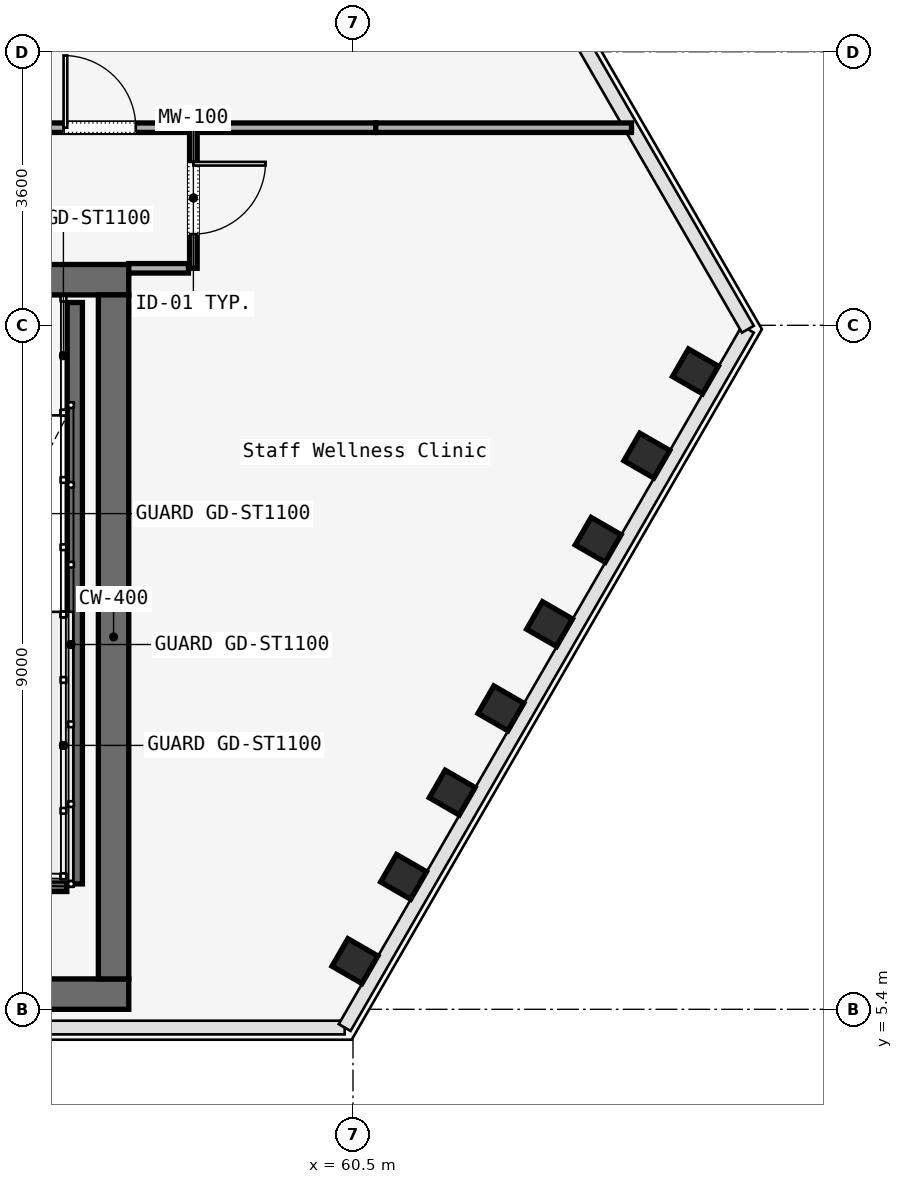
"""IFC4 building model, lengths in metres.
Left out: names, types, materials, properties, quantities, classifications, styles, units other than length and angle.
Written with IfcOpenShell. Run it as: python <this file> out.ifc"""

import sys

from ifc_helpers import new_model, si_unit, direction, frame, frame_2d, origin, origin_2d, place, context, subcontext, project, spatial, rectangle, i_section, extrude, element, fill, save


model = new_model("IFC4")
c1 = context("Model", 3, precision=1e-05, world=origin(), true_north=direction((0.0, 1.0)))
c2 = subcontext(c1, "Body", "Model", "MODEL_VIEW")
j1 = project(units=[si_unit("LENGTHUNIT", "METRE"), si_unit("PLANEANGLEUNIT", "RADIAN")], contexts=[c1])
p1 = place(None, origin())
s1 = spatial("IfcSite", under=j1, at=p1, CompositionType="ELEMENT")
p2 = place(p1, origin())
s2 = spatial("IfcBuilding", under=s1, at=p2, CompositionType="ELEMENT")
p3 = place(p2, frame((0.0, 0.0, 165.0)))
s3 = spatial("IfcBuildingStorey", under=s2, at=p3, CompositionType="ELEMENT", Elevation=165.0)
p4 = place(p3, frame((26.45, 15.0, 0.0), z_axis=(0.0, 0.0, 1.0), x_axis=(1.0, 0.0, 0.0)))
e1 = element("IfcWall", 1, at=p4, inside=s3, PredefinedType="SOLIDWALL", context=c2, shape_type="SweptSolid", body=[
    extrude(rectangle(XDim=31.1, YDim=0.4, at=frame_2d((15.55, 0.0))), origin(), (0.0, 0.0, 1.0), 3.58),
])
p5 = place(p4, frame((1.65, 0.0, 0.0)))
e2 = element("IfcOpeningElement", 2, at=p5, cuts=e1, PredefinedType="OPENING", context=c2, shape_type="SweptSolid", body=[
    extrude(rectangle(XDim=1.1, YDim=2.2, at=frame_2d((0.55, 1.1))), frame((0.0, 0.2, 0.0), z_axis=(0.0, -1.0, 0.0), x_axis=(1.0, 0.0, 0.0)), (0.0, 0.0, 1.0), 0.4),
])
p6 = place(p4, frame((13.65, 0.0, 0.0)))
e3 = element("IfcOpeningElement", 3, at=p6, cuts=e1, PredefinedType="OPENING", context=c2, shape_type="SweptSolid", body=[
    extrude(rectangle(XDim=1.1, YDim=2.2, at=frame_2d((0.55, 1.1))), frame((0.0, 0.2, 0.0), z_axis=(0.0, -1.0, 0.0), x_axis=(1.0, 0.0, 0.0)), (0.0, 0.0, 1.0), 0.4),
])
p7 = place(p4, frame((25.55, 0.0, 0.0)))
e4 = element("IfcOpeningElement", 4, at=p7, cuts=e1, PredefinedType="OPENING", context=c2, shape_type="SweptSolid", body=[
    extrude(rectangle(XDim=1.1, YDim=2.2, at=frame_2d((0.55, 1.1))), frame((0.0, 0.2, 0.0), z_axis=(0.0, -1.0, 0.0), x_axis=(1.0, 0.0, 0.0)), (0.0, 0.0, 1.0), 0.4),
])
p8 = place(p4, frame((10.7, 0.0, 0.0)))
e5 = element("IfcOpeningElement", 5, at=p8, cuts=e1, PredefinedType="OPENING", context=c2, shape_type="SweptSolid", body=[
    extrude(rectangle(XDim=1.4, YDim=2.2, at=frame_2d((0.7, 1.1))), frame((0.0, 0.2, 0.0), z_axis=(0.0, -1.0, 0.0), x_axis=(1.0, 0.0, 0.0)), (0.0, 0.0, 1.0), 0.4),
])
p9 = place(p4, frame((19.35, 0.0, 0.0)))
e6 = element("IfcOpeningElement", 6, at=p9, cuts=e1, PredefinedType="OPENING", context=c2, shape_type="SweptSolid", body=[
    extrude(rectangle(XDim=1.1, YDim=2.2, at=frame_2d((0.55, 1.1))), frame((0.0, 0.2, 0.0), z_axis=(0.0, -1.0, 0.0), x_axis=(1.0, 0.0, 0.0)), (0.0, 0.0, 1.0), 0.4),
])
p10 = place(p4, frame((21.4, 0.0, 0.0)))
e7 = element("IfcOpeningElement", 7, at=p10, cuts=e1, PredefinedType="OPENING", context=c2, shape_type="SweptSolid", body=[
    extrude(rectangle(XDim=0.9, YDim=2.1, at=frame_2d((0.45, 1.05))), frame((0.0, 0.2, 0.0), z_axis=(0.0, -1.0, 0.0), x_axis=(1.0, 0.0, 0.0)), (0.0, 0.0, 1.0), 0.4),
])
p11 = place(p4, frame((23.35, 0.0, 0.0)))
e8 = element("IfcOpeningElement", 8, at=p11, cuts=e1, PredefinedType="OPENING", context=c2, shape_type="SweptSolid", body=[
    extrude(rectangle(XDim=1.3, YDim=2.3, at=frame_2d((0.65, 1.15))), frame((0.0, 0.2, 0.0), z_axis=(0.0, -1.0, 0.0), x_axis=(1.0, 0.0, 0.0)), (0.0, 0.0, 1.0), 0.4),
])
p12 = place(p3, frame((26.45, 5.6, 0.0), z_axis=(0.0, 0.0, 1.0), x_axis=(1.0, 0.0, 0.0)))
e9 = element("IfcWall", 9, at=p12, inside=s3, PredefinedType="SOLIDWALL", context=c2, shape_type="SweptSolid", body=[
    extrude(rectangle(XDim=31.1, YDim=0.4, at=frame_2d((15.55, 0.0))), origin(), (0.0, 0.0, 1.0), 3.58),
])
p13 = place(p3, frame((57.35, 5.8, 0.0), z_axis=(0.0, 0.0, 1.0), x_axis=(0.0, 1.0, 0.0)))
e10 = element("IfcWall", 10, at=p13, inside=s3, PredefinedType="SOLIDWALL", context=c2, shape_type="SweptSolid", body=[
    extrude(rectangle(XDim=9.0, YDim=0.4, at=frame_2d((4.5, 0.0))), origin(), (0.0, 0.0, 1.0), 3.58),
])
for number, where, z_axis, x_axis in (
    (11, (60.526, 6.034, 0.0), (0.0, 0.0, 1.0), (0.5, 0.866, 0.0)),
    (12, (61.166, 7.143, 0.0), (0.0, 0.0, 1.0), (0.5, 0.866, 0.0)),
    (13, (61.806, 8.251, 0.0), (0.0, 0.0, 1.0), (0.5, 0.866, 0.0)),
    (14, (62.446, 9.36, 0.0), (0.0, 0.0, 1.0), (0.5, 0.866, 0.0)),
    (15, (63.086, 10.469, 0.0), (0.0, 0.0, 1.0), (0.5, 0.866, 0.0)),
    (16, (63.726, 11.577, 0.0), (0.0, 0.0, 1.0), (0.5, 0.866, 0.0)),
    (17, (64.366, 12.686, 0.0), (0.0, 0.0, 1.0), (0.5, 0.866, 0.0)),
    (18, (65.006, 13.794, 0.0), (0.0, 0.0, 1.0), (0.5, 0.866, 0.0)),
):
    element("IfcColumn", number, at=place(p3, frame(where, z_axis=z_axis, x_axis=x_axis)), inside=s3, PredefinedType="COLUMN", context=c2, shape_type="SweptSolid", body=[
        extrude(i_section(OverallWidth=0.418, OverallDepth=0.455, WebThickness=0.042, FlangeThickness=0.052, FilletRadius=0.015, at=origin_2d()), origin(), (0.0, 0.0, 1.0), 3.58),
    ])
p14 = place(p3, frame((56.84, 14.7, 0.0), z_axis=(0.0, 0.0, 1.0), x_axis=(0.0, -1.0, 0.0)))
e19 = element("IfcWall", 19, at=p14, inside=s3, PredefinedType="SOLIDWALL", context=c2, shape_type="SweptSolid", body=[
    extrude(rectangle(XDim=7.65, YDim=0.2, at=frame_2d((3.825, 0.0))), origin(), (0.0, 0.0, 1.0), 3.8),
])
p15 = place(p3, frame((53.62, 7.05, 0.0), z_axis=(0.0, 0.0, 1.0), x_axis=(1.0, 0.0, 0.0)))
e20 = element("IfcWall", 20, at=p15, inside=s3, PredefinedType="SOLIDWALL", context=c2, shape_type="SweptSolid", body=[
    extrude(rectangle(XDim=3.115, YDim=0.2, at=frame_2d((1.558, 0.0))), origin(), (0.0, 0.0, 1.0), 3.8),
])
p16 = place(p3, frame((58.4, 17.0, 0.0), z_axis=(0.0, 0.0, 1.0), x_axis=(0.0, -1.0, 0.0)))
e21 = element("IfcWall", 21, at=p16, inside=s3, PredefinedType="MOVABLE", context=c2, shape_type="SweptSolid", body=[
    extrude(rectangle(XDim=1.85, YDim=0.1, at=frame_2d((0.925, 0.0))), origin(), (0.0, 0.0, 1.0), 3.01),
])
p17 = place(p16, frame((0.45, 0.0, 0.0)))
e22 = element("IfcOpeningElement", 22, at=p17, cuts=e21, PredefinedType="OPENING", context=c2, shape_type="SweptSolid", body=[
    extrude(rectangle(XDim=0.95, YDim=2.2, at=frame_2d((0.475, 1.1))), frame((0.0, 0.05, 0.0), z_axis=(0.0, -1.0, 0.0), x_axis=(1.0, 0.0, 0.0)), (0.0, 0.0, 1.0), 0.1),
])
p18 = place(p3, frame((58.335, 15.15, 0.0), z_axis=(0.0, 0.0, 1.0), x_axis=(-1.0, 0.0, 0.0)))
e23 = element("IfcWall", 23, at=p18, inside=s3, PredefinedType="PARTITIONING", context=c2, shape_type="SweptSolid", body=[
    extrude(rectangle(XDim=0.785, YDim=0.125, at=frame_2d((0.393, 0.0))), origin(), (0.0, 0.0, 1.0), 3.01),
])
p19 = place(p3, frame((56.0, 17.0, 0.0), z_axis=(0.0, 0.0, 1.0), x_axis=(1.0, 0.0, 0.0)))
e24 = element("IfcWall", 24, at=p19, inside=s3, PredefinedType="PARTITIONING", context=c2, shape_type="SweptSolid", body=[
    extrude(rectangle(XDim=2.335, YDim=0.125, at=frame_2d((1.167, 0.0))), origin(), (0.0, 0.0, 1.0), 3.01),
])
p20 = place(p19, frame((0.692, 0.0, 0.0)))
e25 = element("IfcOpeningElement", 25, at=p20, cuts=e24, PredefinedType="OPENING", context=c2, shape_type="SweptSolid", body=[
    extrude(rectangle(XDim=0.95, YDim=2.2, at=frame_2d((0.475, 1.1))), frame((0.0, 0.062, 0.0), z_axis=(0.0, -1.0, 0.0), x_axis=(1.0, 0.0, 0.0)), (0.0, 0.0, 1.0), 0.125),
])
p21 = place(p3, frame((58.465, 17.0, 0.0), z_axis=(0.0, 0.0, 1.0), x_axis=(1.0, 0.0, 0.0)))
e26 = element("IfcWall", 26, at=p21, inside=s3, PredefinedType="PARTITIONING", context=c2, shape_type="SweptSolid", body=[
    extrude(rectangle(XDim=2.335, YDim=0.125, at=frame_2d((1.167, 0.0))), origin(), (0.0, 0.0, 1.0), 3.01),
])
p22 = place(p3, frame((60.8, 17.0, 0.0), z_axis=(0.0, 0.0, 1.0), x_axis=(1.0, 0.0, 0.0)))
e27 = element("IfcWall", 27, at=p22, inside=s3, PredefinedType="PARTITIONING", context=c2, shape_type="SweptSolid", body=[
    extrude(rectangle(XDim=3.365, YDim=0.125, at=frame_2d((1.682, 0.0))), origin(), (0.0, 0.0, 1.0), 3.01),
])
p23 = place(p17, origin())
e28 = element("IfcDoor", 28, at=p23, inside=s3, OperationType="SINGLE_SWING_LEFT", PredefinedType="DOOR", context=c2, shape_type="SweptSolid", body=[
    extrude(rectangle(XDim=0.95, YDim=2.2, at=frame_2d((0.475, 1.1))), frame((0.0, 0.025, 0.0), z_axis=(0.0, -1.0, 0.0), x_axis=(1.0, 0.0, 0.0)), (0.0, 0.0, 1.0), 0.05),
])
fill(e22, e28)
p24 = place(p20, origin())
e29 = element("IfcDoor", 29, at=p24, inside=s3, OperationType="SINGLE_SWING_RIGHT", PredefinedType="DOOR", context=c2, shape_type="SweptSolid", body=[
    extrude(rectangle(XDim=0.95, YDim=2.2, at=frame_2d((0.475, 1.1))), frame((0.0, 0.025, 0.0), z_axis=(0.0, -1.0, 0.0), x_axis=(1.0, 0.0, 0.0)), (0.0, 0.0, 1.0), 0.05),
])
fill(e25, e29)
save(model, sys.argv[1])
